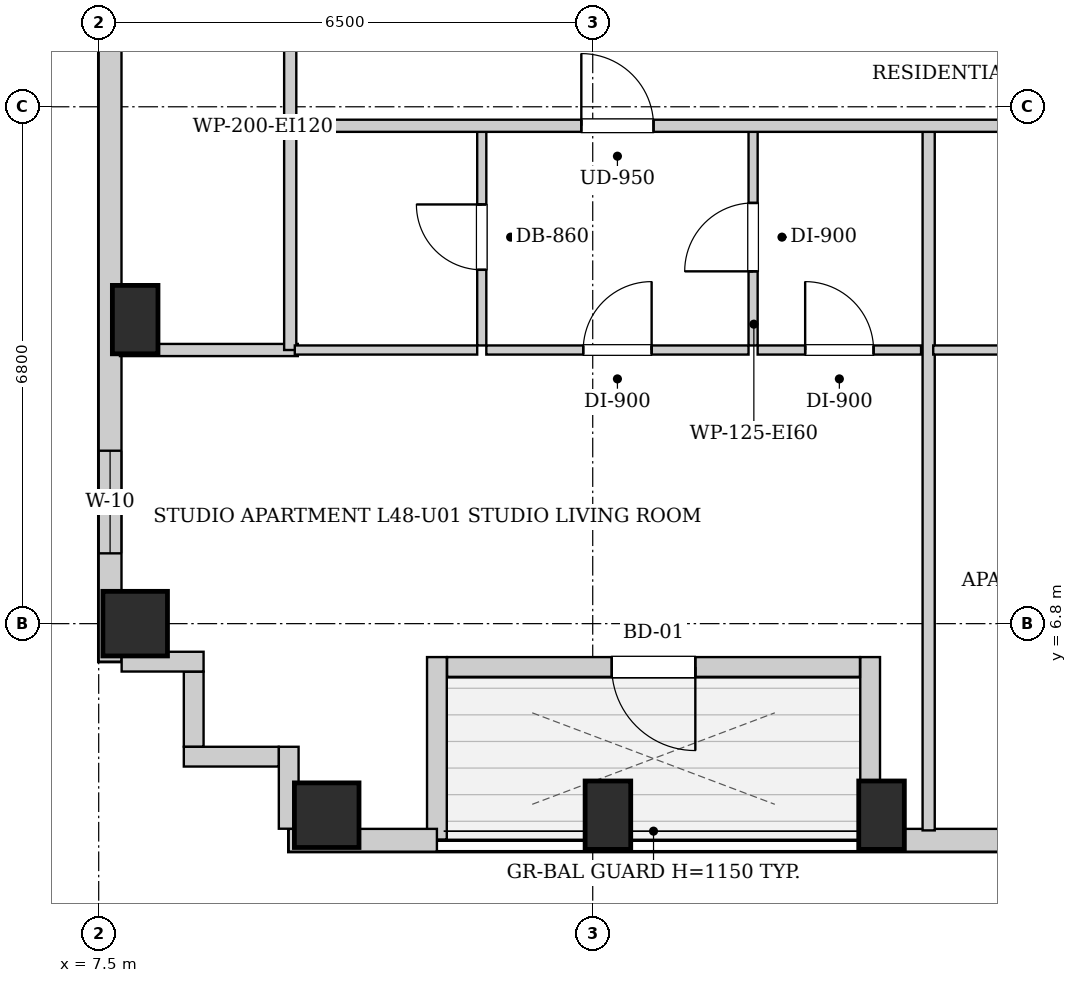
"""IFC4 building model, lengths in metres.
Left out: names, types, materials, properties, quantities, classifications, styles, units other than length and angle.
Written with IfcOpenShell. Run it as: python <this file> out.ifc"""

import sys

from ifc_helpers import new_model, si_unit, direction, frame, frame_2d, origin, origin_2d, place, context, subcontext, project, spatial, rectangle, extrude, element, fill, save


model = new_model("IFC4")
c1 = context("Model", 3, precision=1e-05, world=origin(), true_north=direction((0.0, 1.0)))
c2 = subcontext(c1, "Body", "Model", "MODEL_VIEW")
j1 = project(units=[si_unit("LENGTHUNIT", "METRE"), si_unit("PLANEANGLEUNIT", "RADIAN")], contexts=[c1])
p1 = place(None, origin())
s1 = spatial("IfcSite", under=j1, at=p1, CompositionType="ELEMENT")
p2 = place(p1, origin())
s2 = spatial("IfcBuilding", under=s1, at=p2, CompositionType="ELEMENT")
p3 = place(p2, frame((0.0, 0.0, 166.65)))
s3 = spatial("IfcBuildingStorey", under=s2, at=p3, CompositionType="ELEMENT", Elevation=166.65)
p4 = place(p3, frame((10.5, 4.28, 0.0), z_axis=(0.0, 0.0, 1.0), x_axis=(1.0, 0.0, 0.0)))
e1 = element("IfcColumn", 1, at=p4, inside=s3, PredefinedType="COLUMN", context=c2, shape_type="SweptSolid", body=[
    extrude(rectangle(XDim=0.85, YDim=0.85, at=origin_2d()), origin(), (0.0, 0.0, 1.0), 3.25),
])
for number, where, z_axis, x_axis in (
    (2, (14.2, 4.28, 0.0), (0.0, 0.0, 1.0), (1.0, 0.0, 0.0)),
    (3, (17.8, 4.28, 0.0), (0.0, 0.0, 1.0), (1.0, 0.0, 0.0)),
):
    element("IfcColumn", number, at=place(p3, frame(where, z_axis=z_axis, x_axis=x_axis)), inside=s3, PredefinedType="COLUMN", context=c2, shape_type="SweptSolid", body=[
        extrude(rectangle(XDim=0.6, YDim=0.9, at=origin_2d()), origin(), (0.0, 0.0, 1.0), 3.25),
    ])
p5 = place(p3, frame((7.98, 6.8, 0.0), z_axis=(0.0, 0.0, 1.0), x_axis=(1.0, 0.0, 0.0)))
e4 = element("IfcColumn", 4, at=p5, inside=s3, PredefinedType="COLUMN", context=c2, shape_type="SweptSolid", body=[
    extrude(rectangle(XDim=0.85, YDim=0.85, at=origin_2d()), origin(), (0.0, 0.0, 1.0), 3.25),
])
p6 = place(p3, frame((7.98, 10.8, 0.0), z_axis=(0.0, 0.0, 1.0), x_axis=(1.0, 0.0, 0.0)))
e5 = element("IfcColumn", 5, at=p6, inside=s3, PredefinedType="COLUMN", context=c2, shape_type="SweptSolid", body=[
    extrude(rectangle(XDim=0.6, YDim=0.9, at=origin_2d()), origin(), (0.0, 0.0, 1.0), 3.25),
])
p7 = place(p3, frame((37.8, 3.95, 0.0), z_axis=(0.0, 0.0, 1.0), x_axis=(-1.0, 0.0, 0.0)))
e6 = element("IfcWall", 6, at=p7, inside=s3, PredefinedType="SOLIDWALL", context=c2, shape_type="SweptSolid", body=[
    extrude(rectangle(XDim=20.15, YDim=0.3, at=frame_2d((10.075, 0.0))), origin(), (0.0, 0.0, 1.0), 2.93),
])
p8 = place(p7, frame((15.3, 0.0, 0.55)))
e7 = element("IfcOpeningElement", 7, at=p8, cuts=e6, PredefinedType="OPENING", context=c2, shape_type="SweptSolid", body=[
    extrude(rectangle(XDim=1.35, YDim=1.2, at=frame_2d((0.675, 0.6))), frame((0.0, 0.16, 0.0), z_axis=(0.0, -1.0, 0.0), x_axis=(1.0, 0.0, 0.0)), (0.0, 0.0, 1.0), 0.32),
])
p9 = place(p7, frame((16.91, 0.0, 0.55)))
e8 = element("IfcOpeningElement", 8, at=p9, cuts=e6, PredefinedType="OPENING", context=c2, shape_type="SweptSolid", body=[
    extrude(rectangle(XDim=1.35, YDim=1.2, at=frame_2d((0.675, 0.6))), frame((0.0, 0.16, 0.0), z_axis=(0.0, -1.0, 0.0), x_axis=(1.0, 0.0, 0.0)), (0.0, 0.0, 1.0), 0.32),
])
p10 = place(p7, frame((8.95, 0.0, 0.55)))
e9 = element("IfcOpeningElement", 9, at=p10, cuts=e6, PredefinedType="OPENING", context=c2, shape_type="SweptSolid", body=[
    extrude(rectangle(XDim=1.35, YDim=1.2, at=frame_2d((0.675, 0.6))), frame((0.0, 0.16, 0.0), z_axis=(0.0, -1.0, 0.0), x_axis=(1.0, 0.0, 0.0)), (0.0, 0.0, 1.0), 0.32),
])
p11 = place(p7, frame((7.29, 0.0, 0.55)))
e10 = element("IfcOpeningElement", 10, at=p11, cuts=e6, PredefinedType="OPENING", context=c2, shape_type="SweptSolid", body=[
    extrude(rectangle(XDim=1.35, YDim=1.2, at=frame_2d((0.675, 0.6))), frame((0.0, 0.16, 0.0), z_axis=(0.0, -1.0, 0.0), x_axis=(1.0, 0.0, 0.0)), (0.0, 0.0, 1.0), 0.32),
])
p12 = place(p7, frame((5.06, 0.0, 0.55)))
e11 = element("IfcOpeningElement", 11, at=p12, cuts=e6, PredefinedType="OPENING", context=c2, shape_type="SweptSolid", body=[
    extrude(rectangle(XDim=1.35, YDim=1.2, at=frame_2d((0.675, 0.6))), frame((0.0, 0.16, 0.0), z_axis=(0.0, -1.0, 0.0), x_axis=(1.0, 0.0, 0.0)), (0.0, 0.0, 1.0), 0.32),
])
p13 = place(p3, frame((17.65, 3.96, 0.0), z_axis=(0.0, 0.0, 1.0), x_axis=(0.0, 1.0, 0.0)))
e12 = element("IfcWall", 12, at=p13, inside=s3, PredefinedType="SOLIDWALL", context=c2, shape_type="SweptSolid", body=[
    extrude(rectangle(XDim=2.4, YDim=0.26, at=frame_2d((1.2, 0.0))), origin(), (0.0, 0.0, 1.0), 2.93),
])
p14 = place(p3, frame((17.516, 6.23, 0.0), z_axis=(0.0, 0.0, 1.0), x_axis=(-1.0, 0.0, 0.0)))
e13 = element("IfcWall", 13, at=p14, inside=s3, PredefinedType="SOLIDWALL", context=c2, shape_type="SweptSolid", body=[
    extrude(rectangle(XDim=5.432, YDim=0.26, at=frame_2d((2.716, 0.0))), origin(), (0.0, 0.0, 1.0), 2.93),
])
p15 = place(p14, frame((2.166, 0.0, 0.0)))
e14 = element("IfcOpeningElement", 14, at=p15, cuts=e13, PredefinedType="OPENING", context=c2, shape_type="SweptSolid", body=[
    extrude(rectangle(XDim=1.1, YDim=2.0, at=frame_2d((0.55, 1.0))), frame((0.0, 0.14, 0.0), z_axis=(0.0, -1.0, 0.0), x_axis=(1.0, 0.0, 0.0)), (0.0, 0.0, 1.0), 0.28),
])
p16 = place(p3, frame((11.95, 6.36, 0.0), z_axis=(0.0, 0.0, 1.0), x_axis=(0.0, -1.0, 0.0)))
e15 = element("IfcWall", 15, at=p16, inside=s3, PredefinedType="SOLIDWALL", context=c2, shape_type="SweptSolid", body=[
    extrude(rectangle(XDim=2.4, YDim=0.26, at=frame_2d((1.2, 0.0))), origin(), (0.0, 0.0, 1.0), 2.93),
])
p17 = place(p3, frame((11.95, 3.95, 0.0), z_axis=(0.0, 0.0, 1.0), x_axis=(-1.0, 0.0, 0.0)))
e16 = element("IfcWall", 16, at=p17, inside=s3, PredefinedType="SOLIDWALL", context=c2, shape_type="SweptSolid", body=[
    extrude(rectangle(XDim=1.95, YDim=0.3, at=frame_2d((0.975, 0.0))), origin(), (0.0, 0.0, 1.0), 2.93),
])
p18 = place(p3, frame((7.65, 6.3, 0.0), z_axis=(0.0, 0.0, 1.0), x_axis=(0.0, 1.0, 0.0)))
e17 = element("IfcWall", 17, at=p18, inside=s3, PredefinedType="SOLIDWALL", context=c2, shape_type="SweptSolid", body=[
    extrude(rectangle(XDim=34.5, YDim=0.3, at=frame_2d((17.25, 0.0))), origin(), (0.0, 0.0, 1.0), 2.93),
])
p19 = place(p18, frame((1.425, 0.0, 0.55)))
e18 = element("IfcOpeningElement", 18, at=p19, cuts=e17, PredefinedType="OPENING", context=c2, shape_type="SweptSolid", body=[
    extrude(rectangle(XDim=1.35, YDim=1.2, at=frame_2d((0.675, 0.6))), frame((0.0, 0.16, 0.0), z_axis=(0.0, -1.0, 0.0), x_axis=(1.0, 0.0, 0.0)), (0.0, 0.0, 1.0), 0.32),
])
p20 = place(p18, frame((30.15, 0.0, 0.55)))
e19 = element("IfcOpeningElement", 19, at=p20, cuts=e17, PredefinedType="OPENING", context=c2, shape_type="SweptSolid", body=[
    extrude(rectangle(XDim=1.35, YDim=1.2, at=frame_2d((0.675, 0.6))), frame((0.0, 0.16, 0.0), z_axis=(0.0, -1.0, 0.0), x_axis=(1.0, 0.0, 0.0)), (0.0, 0.0, 1.0), 0.32),
])
p21 = place(p18, frame((28.31, 0.0, 0.55)))
e20 = element("IfcOpeningElement", 20, at=p21, cuts=e17, PredefinedType="OPENING", context=c2, shape_type="SweptSolid", body=[
    extrude(rectangle(XDim=1.35, YDim=1.2, at=frame_2d((0.675, 0.6))), frame((0.0, 0.16, 0.0), z_axis=(0.0, -1.0, 0.0), x_axis=(1.0, 0.0, 0.0)), (0.0, 0.0, 1.0), 0.32),
])
p22 = place(p18, frame((11.85, 0.0, 0.55)))
e21 = element("IfcOpeningElement", 21, at=p22, cuts=e17, PredefinedType="OPENING", context=c2, shape_type="SweptSolid", body=[
    extrude(rectangle(XDim=1.35, YDim=1.2, at=frame_2d((0.675, 0.6))), frame((0.0, 0.16, 0.0), z_axis=(0.0, -1.0, 0.0), x_axis=(1.0, 0.0, 0.0)), (0.0, 0.0, 1.0), 0.32),
])
p23 = place(p18, frame((9.31, 0.0, 0.55)))
e22 = element("IfcOpeningElement", 22, at=p23, cuts=e17, PredefinedType="OPENING", context=c2, shape_type="SweptSolid", body=[
    extrude(rectangle(XDim=1.35, YDim=1.2, at=frame_2d((0.675, 0.6))), frame((0.0, 0.16, 0.0), z_axis=(0.0, -1.0, 0.0), x_axis=(1.0, 0.0, 0.0)), (0.0, 0.0, 1.0), 0.32),
])
p24 = place(p18, frame((18.975, 0.0, 0.55)))
e23 = element("IfcOpeningElement", 23, at=p24, cuts=e17, PredefinedType="OPENING", context=c2, shape_type="SweptSolid", body=[
    extrude(rectangle(XDim=1.35, YDim=1.2, at=frame_2d((0.675, 0.6))), frame((0.0, 0.16, 0.0), z_axis=(0.0, -1.0, 0.0), x_axis=(1.0, 0.0, 0.0)), (0.0, 0.0, 1.0), 0.32),
])
p25 = place(p18, frame((20.585, 0.0, 0.55)))
e24 = element("IfcOpeningElement", 24, at=p25, cuts=e17, PredefinedType="OPENING", context=c2, shape_type="SweptSolid", body=[
    extrude(rectangle(XDim=1.35, YDim=1.2, at=frame_2d((0.675, 0.6))), frame((0.0, 0.16, 0.0), z_axis=(0.0, -1.0, 0.0), x_axis=(1.0, 0.0, 0.0)), (0.0, 0.0, 1.0), 0.32),
])
p26 = place(p3, frame((10.0, 4.102, 0.0), z_axis=(0.0, 0.0, 1.0), x_axis=(0.0, 1.0, 0.0)))
e25 = element("IfcWall", 25, at=p26, inside=s3, PredefinedType="SOLIDWALL", context=c2, shape_type="SweptSolid", body=[
    extrude(rectangle(XDim=1.078, YDim=0.26, at=frame_2d((0.539, 0.0))), origin(), (0.0, 0.0, 1.0), 2.93),
])
p27 = place(p3, frame((9.868, 5.05, 0.0), z_axis=(0.0, 0.0, 1.0), x_axis=(-1.0, 0.0, 0.0)))
e26 = element("IfcWall", 26, at=p27, inside=s3, PredefinedType="SOLIDWALL", context=c2, shape_type="SweptSolid", body=[
    extrude(rectangle(XDim=1.248, YDim=0.26, at=frame_2d((0.624, 0.0))), origin(), (0.0, 0.0, 1.0), 2.93),
])
p28 = place(p3, frame((8.75, 5.182, 0.0), z_axis=(0.0, 0.0, 1.0), x_axis=(0.0, 1.0, 0.0)))
e27 = element("IfcWall", 27, at=p28, inside=s3, PredefinedType="SOLIDWALL", context=c2, shape_type="SweptSolid", body=[
    extrude(rectangle(XDim=0.986, YDim=0.26, at=frame_2d((0.493, 0.0))), origin(), (0.0, 0.0, 1.0), 2.93),
])
p29 = place(p3, frame((8.88, 6.3, 0.0), z_axis=(0.0, 0.0, 1.0), x_axis=(-1.0, 0.0, 0.0)))
e28 = element("IfcWall", 28, at=p29, inside=s3, PredefinedType="SOLIDWALL", context=c2, shape_type="SweptSolid", body=[
    extrude(rectangle(XDim=1.078, YDim=0.26, at=frame_2d((0.539, 0.0))), origin(), (0.0, 0.0, 1.0), 2.93),
])
p30 = place(p3, frame((10.02, 13.35, 0.0), z_axis=(0.0, 0.0, 1.0), x_axis=(0.0, 1.0, 0.0)))
e29 = element("IfcWall", 29, at=p30, inside=s3, PredefinedType="PARTITIONING", context=c2, shape_type="SweptSolid", body=[
    extrude(rectangle(XDim=1.74, YDim=0.16, at=frame_2d((0.87, 0.0))), origin(), (0.0, 0.0, 1.0), 2.93),
])
p31 = place(p3, frame((7.78, 10.4, 0.0), z_axis=(0.0, 0.0, 1.0), x_axis=(1.0, 0.0, 0.0)))
e30 = element("IfcWall", 30, at=p31, inside=s3, PredefinedType="PARTITIONING", context=c2, shape_type="SweptSolid", body=[
    extrude(rectangle(XDim=2.34, YDim=0.16, at=frame_2d((1.17, 0.0))), origin(), (0.0, 0.0, 1.0), 2.93),
])
p32 = place(p3, frame((10.02, 10.4, 0.0), z_axis=(0.0, 0.0, 1.0), x_axis=(0.0, 1.0, 0.0)))
e31 = element("IfcWall", 31, at=p32, inside=s3, PredefinedType="PARTITIONING", context=c2, shape_type="SweptSolid", body=[
    extrude(rectangle(XDim=2.91, YDim=0.16, at=frame_2d((1.455, 0.0))), origin(), (0.0, 0.0, 1.0), 2.93),
])
p33 = place(p3, frame((12.54, 10.46, 0.0), z_axis=(0.0, 0.0, 1.0), x_axis=(0.0, 1.0, 0.0)))
e32 = element("IfcWall", 32, at=p33, inside=s3, PredefinedType="PARTITIONING", context=c2, shape_type="SweptSolid", body=[
    extrude(rectangle(XDim=2.85, YDim=0.12, at=frame_2d((1.425, 0.0))), origin(), (0.0, 0.0, 1.0), 2.93),
])
p34 = place(p33, frame((0.995, 0.0, 0.0)))
e33 = element("IfcOpeningElement", 33, at=p34, cuts=e32, PredefinedType="OPENING", context=c2, shape_type="SweptSolid", body=[
    extrude(rectangle(XDim=0.86, YDim=2.05, at=frame_2d((0.43, 1.025))), frame((0.0, 0.07, 0.0), z_axis=(0.0, -1.0, 0.0), x_axis=(1.0, 0.0, 0.0)), (0.0, 0.0, 1.0), 0.14),
])
p35 = place(p3, frame((10.08, 10.4, 0.0), z_axis=(0.0, 0.0, 1.0), x_axis=(1.0, 0.0, 0.0)))
e34 = element("IfcWall", 34, at=p35, inside=s3, PredefinedType="PARTITIONING", context=c2, shape_type="SweptSolid", body=[
    extrude(rectangle(XDim=2.4, YDim=0.12, at=frame_2d((1.2, 0.0))), origin(), (0.0, 0.0, 1.0), 2.93),
])
p36 = place(p3, frame((16.11, 10.46, 0.0), z_axis=(0.0, 0.0, 1.0), x_axis=(0.0, 1.0, 0.0)))
e35 = element("IfcWall", 35, at=p36, inside=s3, PredefinedType="PARTITIONING", context=c2, shape_type="SweptSolid", body=[
    extrude(rectangle(XDim=2.85, YDim=0.12, at=frame_2d((1.425, 0.0))), origin(), (0.0, 0.0, 1.0), 2.93),
])
p37 = place(p36, frame((0.975, 0.0, 0.0)))
e36 = element("IfcOpeningElement", 36, at=p37, cuts=e35, PredefinedType="OPENING", context=c2, shape_type="SweptSolid", body=[
    extrude(rectangle(XDim=0.9, YDim=2.05, at=frame_2d((0.45, 1.025))), frame((0.0, 0.07, 0.0), z_axis=(0.0, -1.0, 0.0), x_axis=(1.0, 0.0, 0.0)), (0.0, 0.0, 1.0), 0.14),
])
p38 = place(p3, frame((12.6, 10.4, 0.0), z_axis=(0.0, 0.0, 1.0), x_axis=(1.0, 0.0, 0.0)))
e37 = element("IfcWall", 37, at=p38, inside=s3, PredefinedType="PARTITIONING", context=c2, shape_type="SweptSolid", body=[
    extrude(rectangle(XDim=3.45, YDim=0.12, at=frame_2d((1.725, 0.0))), origin(), (0.0, 0.0, 1.0), 2.93),
])
p39 = place(p38, frame((1.275, 0.0, 0.0)))
e38 = element("IfcOpeningElement", 38, at=p39, cuts=e37, PredefinedType="OPENING", context=c2, shape_type="SweptSolid", body=[
    extrude(rectangle(XDim=0.9, YDim=2.05, at=frame_2d((0.45, 1.025))), frame((0.0, 0.07, 0.0), z_axis=(0.0, -1.0, 0.0), x_axis=(1.0, 0.0, 0.0)), (0.0, 0.0, 1.0), 0.14),
])
p40 = place(p3, frame((16.17, 10.4, 0.0), z_axis=(0.0, 0.0, 1.0), x_axis=(1.0, 0.0, 0.0)))
e39 = element("IfcWall", 39, at=p40, inside=s3, PredefinedType="PARTITIONING", context=c2, shape_type="SweptSolid", body=[
    extrude(rectangle(XDim=2.15, YDim=0.12, at=frame_2d((1.075, 0.0))), origin(), (0.0, 0.0, 1.0), 2.93),
])
p41 = place(p40, frame((0.625, 0.0, 0.0)))
e40 = element("IfcOpeningElement", 40, at=p41, cuts=e39, PredefinedType="OPENING", context=c2, shape_type="SweptSolid", body=[
    extrude(rectangle(XDim=0.9, YDim=2.05, at=frame_2d((0.45, 1.025))), frame((0.0, 0.07, 0.0), z_axis=(0.0, -1.0, 0.0), x_axis=(1.0, 0.0, 0.0)), (0.0, 0.0, 1.0), 0.14),
])
p42 = place(p3, frame((18.42, 4.08, 0.0), z_axis=(0.0, 0.0, 1.0), x_axis=(0.0, 1.0, 0.0)))
e41 = element("IfcWall", 41, at=p42, inside=s3, PredefinedType="PARTITIONING", context=c2, shape_type="SweptSolid", body=[
    extrude(rectangle(XDim=9.23, YDim=0.16, at=frame_2d((4.615, 0.0))), origin(), (0.0, 0.0, 1.0), 2.93),
])
p43 = place(p3, frame((18.48, 10.4, 0.0), z_axis=(0.0, 0.0, 1.0), x_axis=(1.0, 0.0, 0.0)))
e42 = element("IfcWall", 42, at=p43, inside=s3, PredefinedType="PARTITIONING", context=c2, shape_type="SweptSolid", body=[
    extrude(rectangle(XDim=2.4, YDim=0.12, at=frame_2d((1.2, 0.0))), origin(), (0.0, 0.0, 1.0), 2.93),
])
p44 = place(p3, frame((10.05, 13.35, 0.0), z_axis=(0.0, 0.0, 1.0), x_axis=(1.0, 0.0, 0.0)))
e43 = element("IfcWall", 43, at=p44, inside=s3, PredefinedType="PARTITIONING", context=c2, shape_type="SweptSolid", body=[
    extrude(rectangle(XDim=27.7, YDim=0.16, at=frame_2d((13.85, 0.0))), origin(), (0.0, 0.0, 1.0), 2.93),
])
p45 = place(p44, frame((3.8, 0.0, 0.0)))
e44 = element("IfcOpeningElement", 44, at=p45, cuts=e43, PredefinedType="OPENING", context=c2, shape_type="SweptSolid", body=[
    extrude(rectangle(XDim=0.95, YDim=2.1, at=frame_2d((0.475, 1.05))), frame((0.0, 0.09, 0.0), z_axis=(0.0, -1.0, 0.0), x_axis=(1.0, 0.0, 0.0)), (0.0, 0.0, 1.0), 0.18),
])
p46 = place(p44, frame((12.695, 0.0, 0.0)))
e45 = element("IfcOpeningElement", 45, at=p46, cuts=e43, PredefinedType="OPENING", context=c2, shape_type="SweptSolid", body=[
    extrude(rectangle(XDim=0.95, YDim=2.1, at=frame_2d((0.475, 1.05))), frame((0.0, 0.09, 0.0), z_axis=(0.0, -1.0, 0.0), x_axis=(1.0, 0.0, 0.0)), (0.0, 0.0, 1.0), 0.18),
])
p47 = place(p34, origin())
e46 = element("IfcDoor", 46, at=p47, inside=s3, OperationType="SINGLE_SWING_RIGHT", PredefinedType="DOOR", context=c2, shape_type="SweptSolid", body=[
    extrude(rectangle(XDim=0.86, YDim=2.05, at=frame_2d((0.43, 1.025))), frame((0.0, 0.025, 0.0), z_axis=(0.0, -1.0, 0.0), x_axis=(1.0, 0.0, 0.0)), (0.0, 0.0, 1.0), 0.05),
])
fill(e33, e46)
p48 = place(p37, origin())
e47 = element("IfcDoor", 47, at=p48, inside=s3, OperationType="SINGLE_SWING_LEFT", PredefinedType="DOOR", context=c2, shape_type="SweptSolid", body=[
    extrude(rectangle(XDim=0.9, YDim=2.05, at=frame_2d((0.45, 1.025))), frame((0.0, 0.025, 0.0), z_axis=(0.0, -1.0, 0.0), x_axis=(1.0, 0.0, 0.0)), (0.0, 0.0, 1.0), 0.05),
])
fill(e36, e47)
p49 = place(p39, origin())
e48 = element("IfcDoor", 48, at=p49, inside=s3, OperationType="SINGLE_SWING_RIGHT", PredefinedType="DOOR", context=c2, shape_type="SweptSolid", body=[
    extrude(rectangle(XDim=0.9, YDim=2.05, at=frame_2d((0.45, 1.025))), frame((0.0, 0.025, 0.0), z_axis=(0.0, -1.0, 0.0), x_axis=(1.0, 0.0, 0.0)), (0.0, 0.0, 1.0), 0.05),
])
fill(e38, e48)
p50 = place(p41, origin())
e49 = element("IfcDoor", 49, at=p50, inside=s3, OperationType="SINGLE_SWING_LEFT", PredefinedType="DOOR", context=c2, shape_type="SweptSolid", body=[
    extrude(rectangle(XDim=0.9, YDim=2.05, at=frame_2d((0.45, 1.025))), frame((0.0, 0.025, 0.0), z_axis=(0.0, -1.0, 0.0), x_axis=(1.0, 0.0, 0.0)), (0.0, 0.0, 1.0), 0.05),
])
fill(e40, e49)
p51 = place(p45, origin())
e50 = element("IfcDoor", 50, at=p51, inside=s3, OperationType="SINGLE_SWING_LEFT", PredefinedType="DOOR", context=c2, shape_type="SweptSolid", body=[
    extrude(rectangle(XDim=0.95, YDim=2.1, at=frame_2d((0.475, 1.05))), frame((0.0, 0.025, 0.0), z_axis=(0.0, -1.0, 0.0), x_axis=(1.0, 0.0, 0.0)), (0.0, 0.0, 1.0), 0.05),
])
fill(e44, e50)
p52 = place(p15, origin())
e51 = element("IfcDoor", 51, at=p52, inside=s3, OperationType="SINGLE_SWING_LEFT", PredefinedType="DOOR", context=c2, shape_type="SweptSolid", body=[
    extrude(rectangle(XDim=1.1, YDim=2.0, at=frame_2d((0.55, 1.0))), frame((0.0, 0.025, 0.0), z_axis=(0.0, -1.0, 0.0), x_axis=(1.0, 0.0, 0.0)), (0.0, 0.0, 1.0), 0.05),
])
fill(e14, e51)
p53 = place(p19, origin())
e52 = element("IfcWindow", 52, at=p53, inside=s3, PartitioningType="SINGLE_PANEL", PredefinedType="WINDOW", context=c2, shape_type="SweptSolid", body=[
    extrude(rectangle(XDim=1.35, YDim=1.2, at=frame_2d((0.675, 0.6))), frame((0.0, 0.03, 0.0), z_axis=(0.0, -1.0, 0.0), x_axis=(1.0, 0.0, 0.0)), (0.0, 0.0, 1.0), 0.06),
])
fill(e18, e52)
save(model, sys.argv[1])
